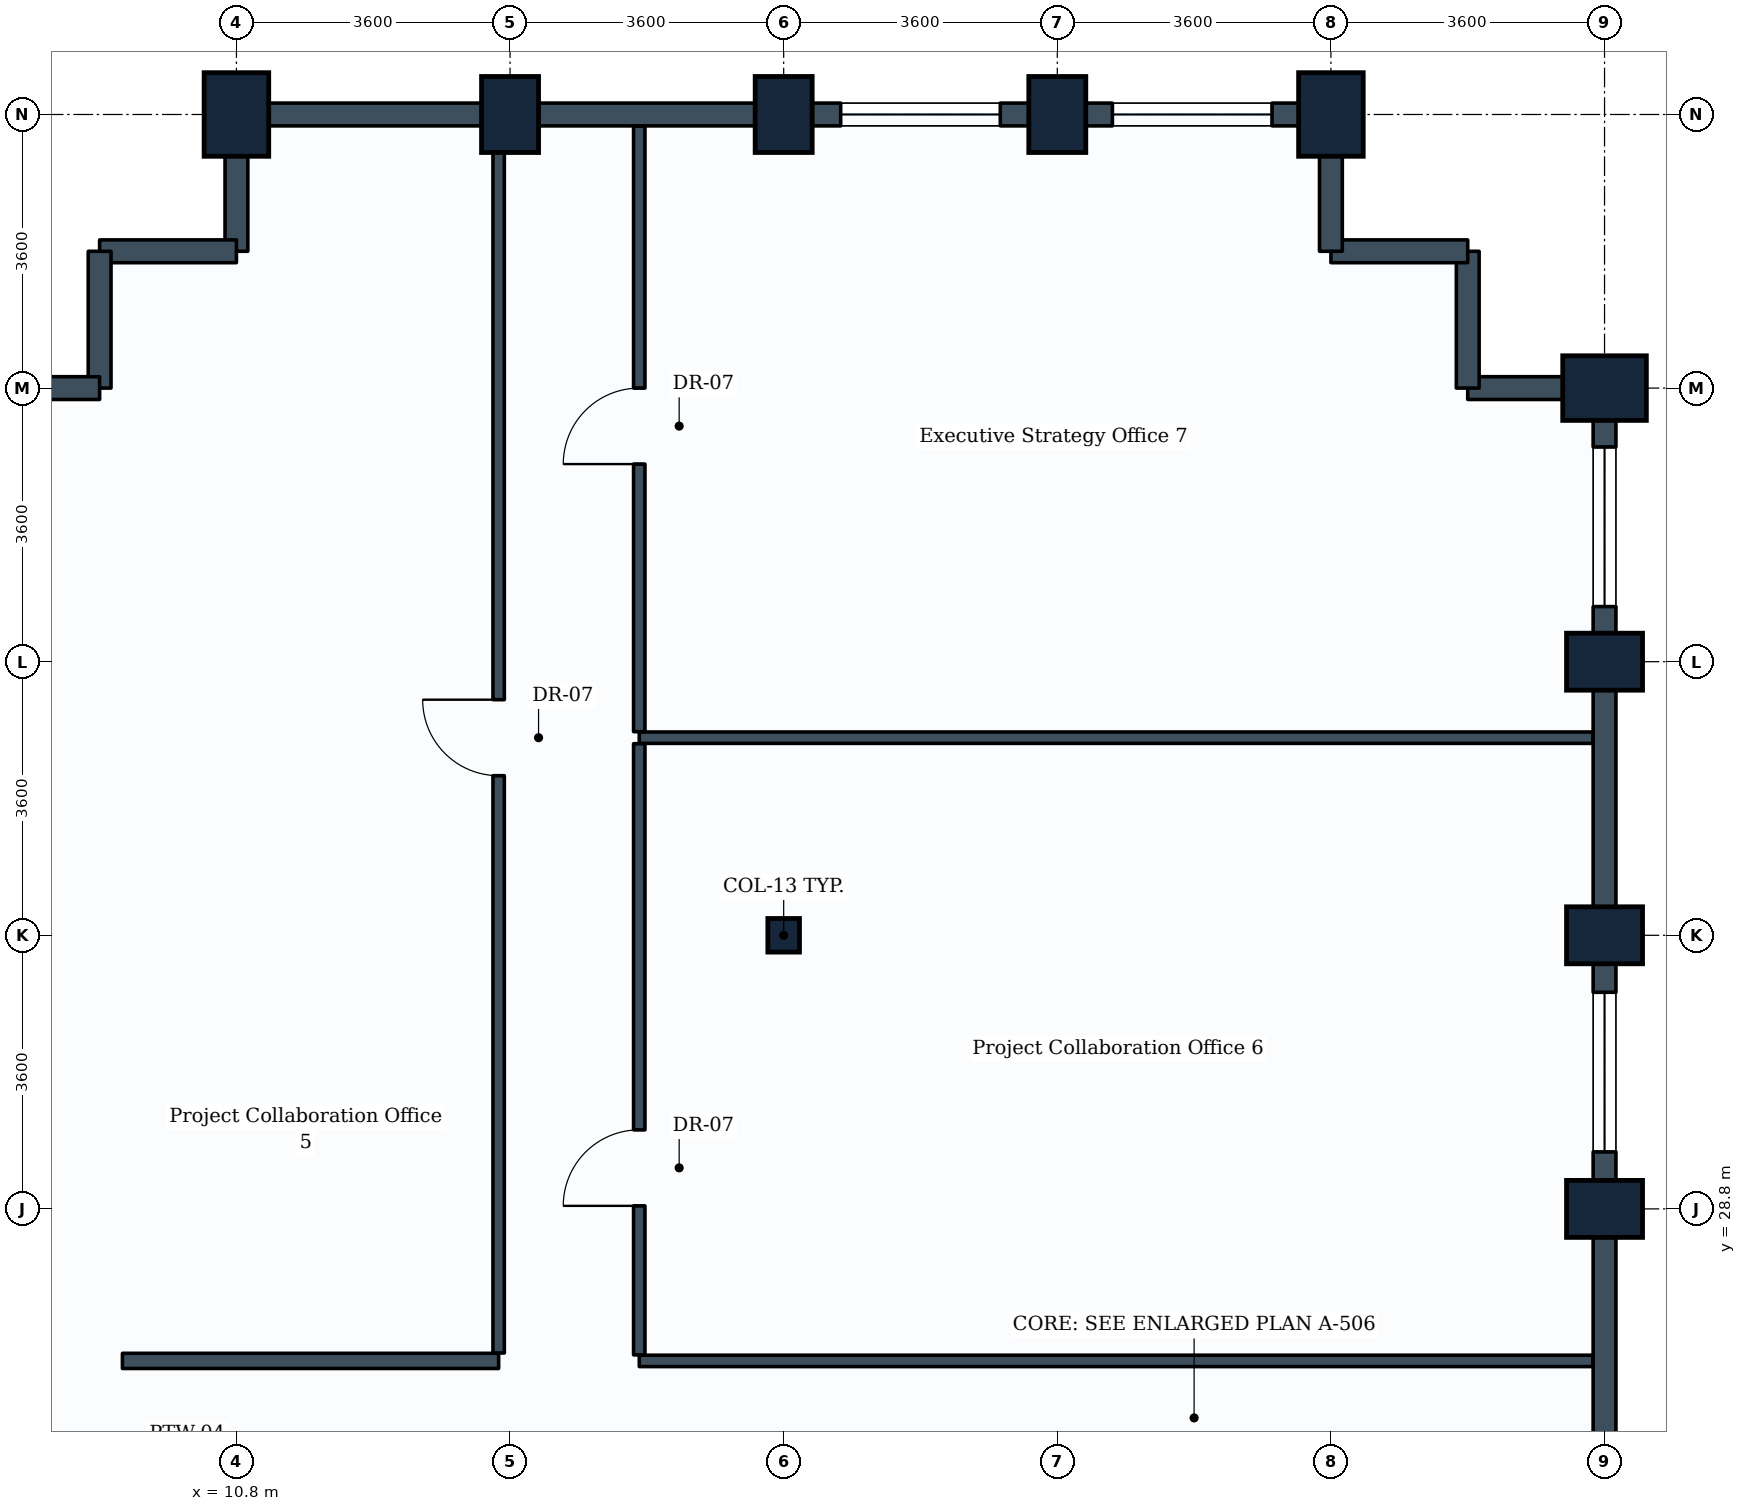
"""IFC4 building model, lengths in metres.
Left out: names, types, materials, properties, quantities, classifications, styles, units other than length and angle.
Written with IfcOpenShell. Run it as: python <this file> out.ifc"""

import sys

from ifc_helpers import new_model, si_unit, direction, frame, frame_2d, origin, origin_2d, place, context, subcontext, project, spatial, rectangle, i_section, extrude, element, fill, save


model = new_model("IFC4")
c1 = context("Model", 3, precision=1e-05, world=origin(), true_north=direction((0.0, 1.0)))
c2 = subcontext(c1, "Body", "Model", "MODEL_VIEW")
j1 = project(units=[si_unit("LENGTHUNIT", "METRE"), si_unit("PLANEANGLEUNIT", "RADIAN")], contexts=[c1])
p1 = place(None, origin())
s1 = spatial("IfcSite", under=j1, at=p1, CompositionType="ELEMENT")
p2 = place(p1, origin())
s2 = spatial("IfcBuilding", under=s1, at=p2, CompositionType="ELEMENT")
p3 = place(p2, frame((0.0, 0.0, 154.2)))
s3 = spatial("IfcBuildingStorey", under=s2, at=p3, CompositionType="ELEMENT", Elevation=154.2)
p4 = place(p3, frame((10.8, 43.2, 0.0), z_axis=(0.0, 0.0, 1.0), x_axis=(1.0, 0.0, 0.0)))
e1 = element("IfcColumn", 1, at=p4, inside=s3, PredefinedType="COLUMN", context=c2, shape_type="SweptSolid", body=[
    extrude(rectangle(XDim=0.85, YDim=1.1, at=origin_2d()), origin(), (0.0, 0.0, 1.0), 3.8),
])
p5 = place(p3, frame((14.4, 43.2, 0.0), z_axis=(0.0, 0.0, 1.0), x_axis=(1.0, 0.0, 0.0)))
e2 = element("IfcColumn", 2, at=p5, inside=s3, PredefinedType="COLUMN", context=c2, shape_type="SweptSolid", body=[
    extrude(rectangle(XDim=0.75, YDim=1.0, at=origin_2d()), origin(), (0.0, 0.0, 1.0), 3.8),
])
p6 = place(p3, frame((18.0, 32.4, 0.0), z_axis=(0.0, 0.0, 1.0), x_axis=(1.0, 0.0, 0.0)))
e3 = element("IfcColumn", 3, at=p6, inside=s3, PredefinedType="COLUMN", context=c2, shape_type="SweptSolid", body=[
    extrude(i_section(OverallWidth=0.416, OverallDepth=0.442, WebThickness=0.025, FlangeThickness=0.041, FilletRadius=0.015, at=origin_2d()), origin(), (0.0, 0.0, 1.0), 3.8),
])
for number, where, z_axis, x_axis in (
    (4, (18.0, 43.2, 0.0), (0.0, 0.0, 1.0), (1.0, 0.0, 0.0)),
    (5, (21.6, 43.2, 0.0), (0.0, 0.0, 1.0), (1.0, 0.0, 0.0)),
):
    element("IfcColumn", number, at=place(p3, frame(where, z_axis=z_axis, x_axis=x_axis)), inside=s3, PredefinedType="COLUMN", context=c2, shape_type="SweptSolid", body=[
        extrude(rectangle(XDim=0.75, YDim=1.0, at=origin_2d()), origin(), (0.0, 0.0, 1.0), 3.8),
    ])
p7 = place(p3, frame((25.2, 43.2, 0.0), z_axis=(0.0, 0.0, 1.0), x_axis=(1.0, 0.0, 0.0)))
e6 = element("IfcColumn", 6, at=p7, inside=s3, PredefinedType="COLUMN", context=c2, shape_type="SweptSolid", body=[
    extrude(rectangle(XDim=0.85, YDim=1.1, at=origin_2d()), origin(), (0.0, 0.0, 1.0), 3.8),
])
for number, where, z_axis, x_axis in (
    (7, (28.8, 28.8, 0.0), (0.0, 0.0, 1.0), (0.0, 1.0, 0.0)),
    (8, (28.8, 32.4, 0.0), (0.0, 0.0, 1.0), (0.0, 1.0, 0.0)),
    (9, (28.8, 36.0, 0.0), (0.0, 0.0, 1.0), (0.0, 1.0, 0.0)),
):
    element("IfcColumn", number, at=place(p3, frame(where, z_axis=z_axis, x_axis=x_axis)), inside=s3, PredefinedType="COLUMN", context=c2, shape_type="SweptSolid", body=[
        extrude(rectangle(XDim=0.75, YDim=1.0, at=origin_2d()), origin(), (0.0, 0.0, 1.0), 3.8),
    ])
p8 = place(p3, frame((28.8, 39.6, 0.0), z_axis=(0.0, 0.0, 1.0), x_axis=(0.0, 1.0, 0.0)))
e10 = element("IfcColumn", 10, at=p8, inside=s3, PredefinedType="COLUMN", context=c2, shape_type="SweptSolid", body=[
    extrude(rectangle(XDim=0.85, YDim=1.1, at=origin_2d()), origin(), (0.0, 0.0, 1.0), 3.8),
])
p9 = place(p3, frame((28.8, 28.8, 0.0), z_axis=(0.0, 0.0, 1.0), x_axis=(0.0, -1.0, 0.0)))
e11 = element("IfcWall", 11, at=p9, inside=s3, PredefinedType="STANDARD", context=c2, shape_type="SweptSolid", body=[
    extrude(rectangle(XDim=3.6, YDim=0.3, at=frame_2d((1.8, 0.0))), origin(), (0.0, 0.0, 1.0), 3.17),
])
p10 = place(p3, frame((28.8, 32.4, 0.0), z_axis=(0.0, 0.0, 1.0), x_axis=(0.0, -1.0, 0.0)))
e12 = element("IfcWall", 12, at=p10, inside=s3, PredefinedType="STANDARD", context=c2, shape_type="SweptSolid", body=[
    extrude(rectangle(XDim=3.6, YDim=0.3, at=frame_2d((1.8, 0.0))), origin(), (0.0, 0.0, 1.0), 2.93),
])
p11 = place(p10, frame((0.75, 0.0, 0.85)))
e13 = element("IfcOpeningElement", 13, at=p11, cuts=e12, PredefinedType="OPENING", context=c2, shape_type="SweptSolid", body=[
    extrude(rectangle(XDim=2.1, YDim=1.35, at=frame_2d((1.05, 0.675))), frame((0.0, 0.16, 0.0), z_axis=(0.0, -1.0, 0.0), x_axis=(1.0, 0.0, 0.0)), (0.0, 0.0, 1.0), 0.32),
])
p12 = place(p3, frame((28.8, 36.0, 0.0), z_axis=(0.0, 0.0, 1.0), x_axis=(0.0, -1.0, 0.0)))
e14 = element("IfcWall", 14, at=p12, inside=s3, PredefinedType="STANDARD", context=c2, shape_type="SweptSolid", body=[
    extrude(rectangle(XDim=3.6, YDim=0.3, at=frame_2d((1.8, 0.0))), origin(), (0.0, 0.0, 1.0), 2.93),
])
p13 = place(p3, frame((28.8, 39.6, 0.0), z_axis=(0.0, 0.0, 1.0), x_axis=(0.0, -1.0, 0.0)))
e15 = element("IfcWall", 15, at=p13, inside=s3, PredefinedType="STANDARD", context=c2, shape_type="SweptSolid", body=[
    extrude(rectangle(XDim=3.6, YDim=0.3, at=frame_2d((1.8, 0.0))), origin(), (0.0, 0.0, 1.0), 2.93),
])
p14 = place(p13, frame((0.775, 0.0, 0.85)))
e16 = element("IfcOpeningElement", 16, at=p14, cuts=e15, PredefinedType="OPENING", context=c2, shape_type="SweptSolid", body=[
    extrude(rectangle(XDim=2.1, YDim=1.35, at=frame_2d((1.05, 0.675))), frame((0.0, 0.16, 0.0), z_axis=(0.0, -1.0, 0.0), x_axis=(1.0, 0.0, 0.0)), (0.0, 0.0, 1.0), 0.32),
])
p15 = place(p3, frame((27.0, 39.6, 0.0), z_axis=(0.0, 0.0, 1.0), x_axis=(1.0, 0.0, 0.0)))
e17 = element("IfcWall", 17, at=p15, inside=s3, PredefinedType="STANDARD", context=c2, shape_type="SweptSolid", body=[
    extrude(rectangle(XDim=1.8, YDim=0.3, at=frame_2d((0.9, 0.0))), origin(), (0.0, 0.0, 1.0), 2.93),
])
p16 = place(p3, frame((27.0, 39.6, 0.0), z_axis=(0.0, 0.0, 1.0), x_axis=(0.0, 1.0, 0.0)))
e18 = element("IfcWall", 18, at=p16, inside=s3, PredefinedType="STANDARD", context=c2, shape_type="SweptSolid", body=[
    extrude(rectangle(XDim=1.8, YDim=0.3, at=frame_2d((0.9, 0.0))), origin(), (0.0, 0.0, 1.0), 3.535),
])
p17 = place(p3, frame((25.2, 41.4, 0.0), z_axis=(0.0, 0.0, 1.0), x_axis=(1.0, 0.0, 0.0)))
e19 = element("IfcWall", 19, at=p17, inside=s3, PredefinedType="STANDARD", context=c2, shape_type="SweptSolid", body=[
    extrude(rectangle(XDim=1.8, YDim=0.3, at=frame_2d((0.9, 0.0))), origin(), (0.0, 0.0, 1.0), 3.535),
])
p18 = place(p3, frame((25.2, 41.4, 0.0), z_axis=(0.0, 0.0, 1.0), x_axis=(0.0, 1.0, 0.0)))
e20 = element("IfcWall", 20, at=p18, inside=s3, PredefinedType="STANDARD", context=c2, shape_type="SweptSolid", body=[
    extrude(rectangle(XDim=1.8, YDim=0.3, at=frame_2d((0.9, 0.0))), origin(), (0.0, 0.0, 1.0), 2.93),
])
p19 = place(p3, frame((21.6, 43.2, 0.0), z_axis=(0.0, 0.0, 1.0), x_axis=(1.0, 0.0, 0.0)))
e21 = element("IfcWall", 21, at=p19, inside=s3, PredefinedType="STANDARD", context=c2, shape_type="SweptSolid", body=[
    extrude(rectangle(XDim=3.6, YDim=0.3, at=frame_2d((1.8, 0.0))), origin(), (0.0, 0.0, 1.0), 2.93),
])
p20 = place(p19, frame((0.725, 0.0, 0.85)))
e22 = element("IfcOpeningElement", 22, at=p20, cuts=e21, PredefinedType="OPENING", context=c2, shape_type="SweptSolid", body=[
    extrude(rectangle(XDim=2.1, YDim=1.35, at=frame_2d((1.05, 0.675))), frame((0.0, 0.16, 0.0), z_axis=(0.0, -1.0, 0.0), x_axis=(1.0, 0.0, 0.0)), (0.0, 0.0, 1.0), 0.32),
])
p21 = place(p3, frame((18.0, 43.2, 0.0), z_axis=(0.0, 0.0, 1.0), x_axis=(1.0, 0.0, 0.0)))
e23 = element("IfcWall", 23, at=p21, inside=s3, PredefinedType="STANDARD", context=c2, shape_type="SweptSolid", body=[
    extrude(rectangle(XDim=3.6, YDim=0.3, at=frame_2d((1.8, 0.0))), origin(), (0.0, 0.0, 1.0), 2.93),
])
p22 = place(p21, frame((0.75, 0.0, 0.85)))
e24 = element("IfcOpeningElement", 24, at=p22, cuts=e23, PredefinedType="OPENING", context=c2, shape_type="SweptSolid", body=[
    extrude(rectangle(XDim=2.1, YDim=1.35, at=frame_2d((1.05, 0.675))), frame((0.0, 0.16, 0.0), z_axis=(0.0, -1.0, 0.0), x_axis=(1.0, 0.0, 0.0)), (0.0, 0.0, 1.0), 0.32),
])
p23 = place(p3, frame((14.4, 43.2, 0.0), z_axis=(0.0, 0.0, 1.0), x_axis=(1.0, 0.0, 0.0)))
e25 = element("IfcWall", 25, at=p23, inside=s3, PredefinedType="STANDARD", context=c2, shape_type="SweptSolid", body=[
    extrude(rectangle(XDim=3.6, YDim=0.3, at=frame_2d((1.8, 0.0))), origin(), (0.0, 0.0, 1.0), 2.93),
])
p24 = place(p3, frame((10.8, 43.2, 0.0), z_axis=(0.0, 0.0, 1.0), x_axis=(1.0, 0.0, 0.0)))
e26 = element("IfcWall", 26, at=p24, inside=s3, PredefinedType="STANDARD", context=c2, shape_type="SweptSolid", body=[
    extrude(rectangle(XDim=3.6, YDim=0.3, at=frame_2d((1.8, 0.0))), origin(), (0.0, 0.0, 1.0), 2.93),
])
p25 = place(p3, frame((10.8, 41.4, 0.0), z_axis=(0.0, 0.0, 1.0), x_axis=(0.0, 1.0, 0.0)))
e27 = element("IfcWall", 27, at=p25, inside=s3, PredefinedType="STANDARD", context=c2, shape_type="SweptSolid", body=[
    extrude(rectangle(XDim=1.8, YDim=0.3, at=frame_2d((0.9, 0.0))), origin(), (0.0, 0.0, 1.0), 2.93),
])
p26 = place(p3, frame((9.0, 41.4, 0.0), z_axis=(0.0, 0.0, 1.0), x_axis=(1.0, 0.0, 0.0)))
e28 = element("IfcWall", 28, at=p26, inside=s3, PredefinedType="STANDARD", context=c2, shape_type="SweptSolid", body=[
    extrude(rectangle(XDim=1.8, YDim=0.3, at=frame_2d((0.9, 0.0))), origin(), (0.0, 0.0, 1.0), 3.535),
])
p27 = place(p3, frame((9.0, 39.6, 0.0), z_axis=(0.0, 0.0, 1.0), x_axis=(0.0, 1.0, 0.0)))
e29 = element("IfcWall", 29, at=p27, inside=s3, PredefinedType="STANDARD", context=c2, shape_type="SweptSolid", body=[
    extrude(rectangle(XDim=1.8, YDim=0.3, at=frame_2d((0.9, 0.0))), origin(), (0.0, 0.0, 1.0), 3.535),
])
p28 = place(p3, frame((7.2, 39.6, 0.0), z_axis=(0.0, 0.0, 1.0), x_axis=(1.0, 0.0, 0.0)))
e30 = element("IfcWall", 30, at=p28, inside=s3, PredefinedType="STANDARD", context=c2, shape_type="SweptSolid", body=[
    extrude(rectangle(XDim=1.8, YDim=0.3, at=frame_2d((0.9, 0.0))), origin(), (0.0, 0.0, 1.0), 2.93),
])
p29 = place(p3, frame((9.3, 26.8, 0.0), z_axis=(0.0, 0.0, 1.0), x_axis=(1.0, 0.0, 0.0)))
e31 = element("IfcWall", 31, at=p29, inside=s3, PredefinedType="PARTITIONING", context=c2, shape_type="SweptSolid", body=[
    extrude(rectangle(XDim=4.95, YDim=0.2, at=frame_2d((2.475, 0.0))), origin(), (0.0, 0.0, 1.0), 3.535),
])
p30 = place(p3, frame((14.25, 26.904, 0.0), z_axis=(0.0, 0.0, 1.0), x_axis=(0.0, 1.0, 0.0)))
e32 = element("IfcWall", 32, at=p30, inside=s3, PredefinedType="PARTITIONING", context=c2, shape_type="SweptSolid", body=[
    extrude(rectangle(XDim=16.142, YDim=0.15, at=frame_2d((8.071, 0.0))), origin(), (0.0, 0.0, 1.0), 2.93),
])
p31 = place(p30, frame((7.596, 0.0, 0.0)))
e33 = element("IfcOpeningElement", 33, at=p31, cuts=e32, PredefinedType="OPENING", context=c2, shape_type="SweptSolid", body=[
    extrude(rectangle(XDim=1.0, YDim=2.1, at=frame_2d((0.5, 1.05))), frame((0.0, 0.085, 0.0), z_axis=(0.0, -1.0, 0.0), x_axis=(1.0, 0.0, 0.0)), (0.0, 0.0, 1.0), 0.17),
])
p32 = place(p3, frame((16.1, 26.8, 0.0), z_axis=(0.0, 0.0, 1.0), x_axis=(1.0, 0.0, 0.0)))
e34 = element("IfcWall", 34, at=p32, inside=s3, PredefinedType="PARTITIONING", context=c2, shape_type="SweptSolid", body=[
    extrude(rectangle(XDim=12.546, YDim=0.15, at=frame_2d((6.273, 0.0))), origin(), (0.0, 0.0, 1.0), 3.17),
])
p33 = place(p3, frame((16.1, 35.0, 0.0), z_axis=(0.0, 0.0, 1.0), x_axis=(1.0, 0.0, 0.0)))
e35 = element("IfcWall", 35, at=p33, inside=s3, PredefinedType="PARTITIONING", context=c2, shape_type="SweptSolid", body=[
    extrude(rectangle(XDim=12.546, YDim=0.15, at=frame_2d((6.273, 0.0))), origin(), (0.0, 0.0, 1.0), 2.93),
])
p34 = place(p3, frame((16.1, 26.879, 0.0), z_axis=(0.0, 0.0, 1.0), x_axis=(0.0, 1.0, 0.0)))
e36 = element("IfcWall", 36, at=p34, inside=s3, PredefinedType="PARTITIONING", context=c2, shape_type="SweptSolid", body=[
    extrude(rectangle(XDim=8.042, YDim=0.15, at=frame_2d((4.021, 0.0))), origin(), (0.0, 0.0, 1.0), 3.17),
])
p35 = place(p34, frame((1.961, 0.0, 0.0)))
e37 = element("IfcOpeningElement", 37, at=p35, cuts=e36, PredefinedType="OPENING", context=c2, shape_type="SweptSolid", body=[
    extrude(rectangle(XDim=1.0, YDim=2.1, at=frame_2d((0.5, 1.05))), frame((0.0, 0.085, 0.0), z_axis=(0.0, -1.0, 0.0), x_axis=(1.0, 0.0, 0.0)), (0.0, 0.0, 1.0), 0.17),
])
p36 = place(p3, frame((16.1, 35.079, 0.0), z_axis=(0.0, 0.0, 1.0), x_axis=(0.0, 1.0, 0.0)))
e38 = element("IfcWall", 38, at=p36, inside=s3, PredefinedType="PARTITIONING", context=c2, shape_type="SweptSolid", body=[
    extrude(rectangle(XDim=7.967, YDim=0.15, at=frame_2d((3.983, 0.0))), origin(), (0.0, 0.0, 1.0), 2.93),
])
p37 = place(p36, frame((3.521, 0.0, 0.0)))
e39 = element("IfcOpeningElement", 39, at=p37, cuts=e38, PredefinedType="OPENING", context=c2, shape_type="SweptSolid", body=[
    extrude(rectangle(XDim=1.0, YDim=2.1, at=frame_2d((0.5, 1.05))), frame((0.0, 0.085, 0.0), z_axis=(0.0, -1.0, 0.0), x_axis=(1.0, 0.0, 0.0)), (0.0, 0.0, 1.0), 0.17),
])
p38 = place(p11, origin())
e40 = element("IfcWindow", 40, at=p38, inside=s3, PartitioningType="SINGLE_PANEL", PredefinedType="WINDOW", context=c2, shape_type="SweptSolid", body=[
    extrude(rectangle(XDim=2.1, YDim=1.35, at=frame_2d((1.05, 0.675))), frame((0.0, 0.03, 0.0), z_axis=(0.0, -1.0, 0.0), x_axis=(1.0, 0.0, 0.0)), (0.0, 0.0, 1.0), 0.06),
])
fill(e13, e40)
p39 = place(p14, origin())
e41 = element("IfcWindow", 41, at=p39, inside=s3, PartitioningType="SINGLE_PANEL", PredefinedType="WINDOW", context=c2, shape_type="SweptSolid", body=[
    extrude(rectangle(XDim=2.1, YDim=1.35, at=frame_2d((1.05, 0.675))), frame((0.0, 0.03, 0.0), z_axis=(0.0, -1.0, 0.0), x_axis=(1.0, 0.0, 0.0)), (0.0, 0.0, 1.0), 0.06),
])
fill(e16, e41)
p40 = place(p20, origin())
e42 = element("IfcWindow", 42, at=p40, inside=s3, PartitioningType="SINGLE_PANEL", PredefinedType="WINDOW", context=c2, shape_type="SweptSolid", body=[
    extrude(rectangle(XDim=2.1, YDim=1.35, at=frame_2d((1.05, 0.675))), frame((0.0, 0.03, 0.0), z_axis=(0.0, -1.0, 0.0), x_axis=(1.0, 0.0, 0.0)), (0.0, 0.0, 1.0), 0.06),
])
fill(e22, e42)
p41 = place(p22, origin())
e43 = element("IfcWindow", 43, at=p41, inside=s3, PartitioningType="SINGLE_PANEL", PredefinedType="WINDOW", context=c2, shape_type="SweptSolid", body=[
    extrude(rectangle(XDim=2.1, YDim=1.35, at=frame_2d((1.05, 0.675))), frame((0.0, 0.03, 0.0), z_axis=(0.0, -1.0, 0.0), x_axis=(1.0, 0.0, 0.0)), (0.0, 0.0, 1.0), 0.06),
])
fill(e24, e43)
p42 = place(p31, origin())
e44 = element("IfcDoor", 44, at=p42, inside=s3, OperationType="SINGLE_SWING_RIGHT", PredefinedType="DOOR", context=c2, shape_type="SweptSolid", body=[
    extrude(rectangle(XDim=1.0, YDim=2.1, at=frame_2d((0.5, 1.05))), frame((0.0, 0.025, 0.0), z_axis=(0.0, -1.0, 0.0), x_axis=(1.0, 0.0, 0.0)), (0.0, 0.0, 1.0), 0.05),
])
fill(e33, e44)
p43 = place(p35, origin())
e45 = element("IfcDoor", 45, at=p43, inside=s3, OperationType="SINGLE_SWING_LEFT", PredefinedType="DOOR", context=c2, shape_type="SweptSolid", body=[
    extrude(rectangle(XDim=1.0, YDim=2.1, at=frame_2d((0.5, 1.05))), frame((0.0, 0.025, 0.0), z_axis=(0.0, -1.0, 0.0), x_axis=(1.0, 0.0, 0.0)), (0.0, 0.0, 1.0), 0.05),
])
fill(e37, e45)
p44 = place(p37, origin())
e46 = element("IfcDoor", 46, at=p44, inside=s3, OperationType="SINGLE_SWING_LEFT", PredefinedType="DOOR", context=c2, shape_type="SweptSolid", body=[
    extrude(rectangle(XDim=1.0, YDim=2.1, at=frame_2d((0.5, 1.05))), frame((0.0, 0.025, 0.0), z_axis=(0.0, -1.0, 0.0), x_axis=(1.0, 0.0, 0.0)), (0.0, 0.0, 1.0), 0.05),
])
fill(e39, e46)
save(model, sys.argv[1])
